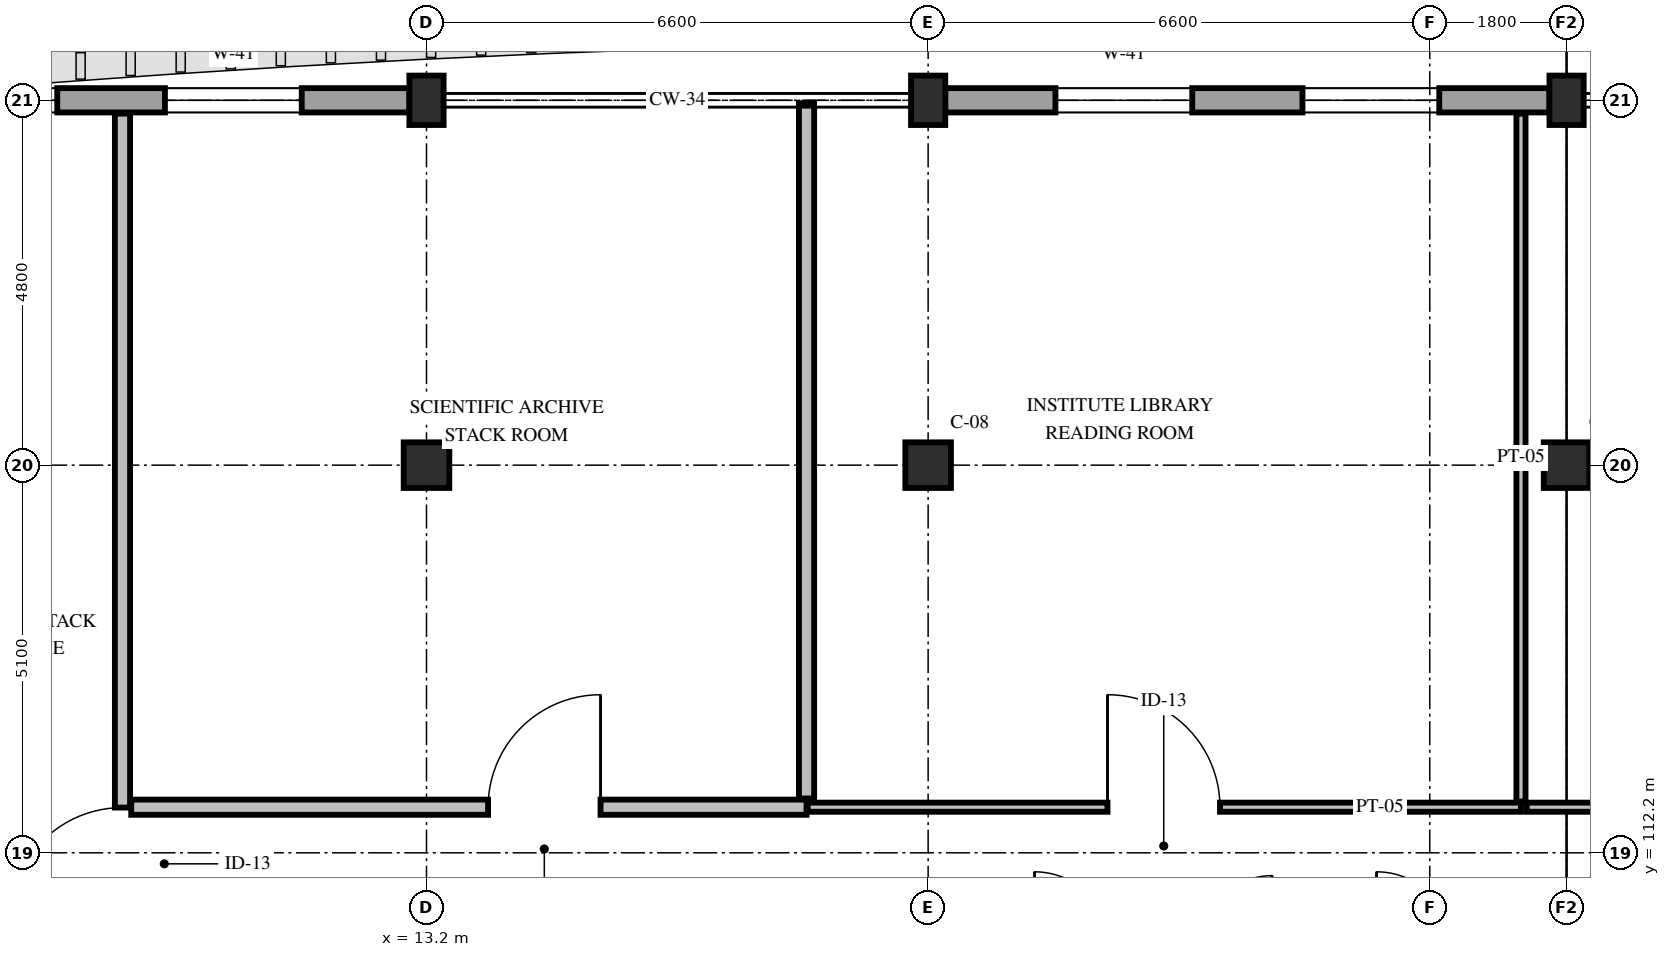
"""IFC4 building model, lengths in metres.
Left out: names, types, materials, properties, quantities, classifications, styles, units other than length and angle.
Written with IfcOpenShell. Run it as: python <this file> out.ifc"""

import sys

from ifc_helpers import new_model, si_unit, direction, frame, frame_2d, origin, origin_2d, place, context, subcontext, project, spatial, rectangle, extrude, element, fill, save


model = new_model("IFC4")
c1 = context("Model", 3, precision=1e-05, world=origin(), true_north=direction((0.0, 1.0)))
c2 = subcontext(c1, "Body", "Model", "MODEL_VIEW")
j1 = project(units=[si_unit("LENGTHUNIT", "METRE"), si_unit("PLANEANGLEUNIT", "RADIAN")], contexts=[c1])
p1 = place(None, origin())
s1 = spatial("IfcSite", under=j1, at=p1, CompositionType="ELEMENT")
p2 = place(p1, origin())
s2 = spatial("IfcBuilding", under=s1, at=p2, CompositionType="ELEMENT")
p3 = place(p2, frame((0.0, 0.0, 42.6)))
s3 = spatial("IfcBuildingStorey", under=s2, at=p3, CompositionType="ELEMENT", Elevation=42.6)
p4 = place(p3, frame((13.2, 117.3, 0.0), z_axis=(0.0, 0.0, 1.0), x_axis=(1.0, 0.0, 0.0)))
e1 = element("IfcColumn", 1, at=p4, inside=s3, PredefinedType="COLUMN", context=c2, shape_type="SweptSolid", body=[
    extrude(rectangle(XDim=0.6, YDim=0.6, at=origin_2d()), origin(), (0.0, 0.0, 1.0), 4.2),
])
p5 = place(p3, frame((13.2, 122.1, 0.0), z_axis=(0.0, 0.0, 1.0), x_axis=(1.0, 0.0, 0.0)))
e2 = element("IfcColumn", 2, at=p5, inside=s3, PredefinedType="PILASTER", context=c2, shape_type="SweptSolid", body=[
    extrude(rectangle(XDim=0.45, YDim=0.65, at=origin_2d()), origin(), (0.0, 0.0, 1.0), 4.2),
])
p6 = place(p3, frame((19.8, 117.3, 0.0), z_axis=(0.0, 0.0, 1.0), x_axis=(1.0, 0.0, 0.0)))
e3 = element("IfcColumn", 3, at=p6, inside=s3, PredefinedType="COLUMN", context=c2, shape_type="SweptSolid", body=[
    extrude(rectangle(XDim=0.6, YDim=0.6, at=origin_2d()), origin(), (0.0, 0.0, 1.0), 4.2),
])
p7 = place(p3, frame((19.8, 122.1, 0.0), z_axis=(0.0, 0.0, 1.0), x_axis=(1.0, 0.0, 0.0)))
e4 = element("IfcColumn", 4, at=p7, inside=s3, PredefinedType="PILASTER", context=c2, shape_type="SweptSolid", body=[
    extrude(rectangle(XDim=0.45, YDim=0.65, at=origin_2d()), origin(), (0.0, 0.0, 1.0), 4.2),
])
p8 = place(p3, frame((28.2, 117.3, 0.0), z_axis=(0.0, 0.0, 1.0), x_axis=(1.0, 0.0, 0.0)))
e5 = element("IfcColumn", 5, at=p8, inside=s3, PredefinedType="COLUMN", context=c2, shape_type="SweptSolid", body=[
    extrude(rectangle(XDim=0.6, YDim=0.6, at=origin_2d()), origin(), (0.0, 0.0, 1.0), 4.2),
])
p9 = place(p3, frame((28.2, 122.1, 0.0), z_axis=(0.0, 0.0, 1.0), x_axis=(1.0, 0.0, 0.0)))
e6 = element("IfcColumn", 6, at=p9, inside=s3, PredefinedType="PILASTER", context=c2, shape_type="SweptSolid", body=[
    extrude(rectangle(XDim=0.45, YDim=0.65, at=origin_2d()), origin(), (0.0, 0.0, 1.0), 4.2),
])
p10 = place(p3, frame((5.125, 122.1, 0.0), z_axis=(0.0, 0.0, 1.0), x_axis=(1.0, 0.0, 0.0)))
e7 = element("IfcWall", 7, at=p10, inside=s3, PredefinedType="STANDARD", context=c2, shape_type="SweptSolid", body=[
    extrude(rectangle(XDim=7.85, YDim=0.32, at=frame_2d((3.925, 0.0))), origin(), (0.0, 0.0, 1.0), 3.35),
])
p11 = place(p10, frame((1.417, 0.0, 0.65)))
e8 = element("IfcOpeningElement", 8, at=p11, cuts=e7, PredefinedType="OPENING", context=c2, shape_type="SweptSolid", body=[
    extrude(rectangle(XDim=1.8, YDim=2.24, at=frame_2d((0.9, 1.12))), frame((0.0, 0.175, 0.0), z_axis=(0.0, -1.0, 0.0), x_axis=(1.0, 0.0, 0.0)), (0.0, 0.0, 1.0), 0.35),
])
p12 = place(p10, frame((4.633, 0.0, 0.65)))
e9 = element("IfcOpeningElement", 9, at=p12, cuts=e7, PredefinedType="OPENING", context=c2, shape_type="SweptSolid", body=[
    extrude(rectangle(XDim=1.8, YDim=2.24, at=frame_2d((0.9, 1.12))), frame((0.0, 0.175, 0.0), z_axis=(0.0, -1.0, 0.0), x_axis=(1.0, 0.0, 0.0)), (0.0, 0.0, 1.0), 0.35),
])
p13 = place(p3, frame((20.025, 122.1, 0.0), z_axis=(0.0, 0.0, 1.0), x_axis=(1.0, 0.0, 0.0)))
e10 = element("IfcWall", 10, at=p13, inside=s3, PredefinedType="STANDARD", context=c2, shape_type="SweptSolid", body=[
    extrude(rectangle(XDim=7.95, YDim=0.32, at=frame_2d((3.975, 0.0))), origin(), (0.0, 0.0, 1.0), 3.35),
])
p14 = place(p13, frame((1.45, 0.0, 0.65)))
e11 = element("IfcOpeningElement", 11, at=p14, cuts=e10, PredefinedType="OPENING", context=c2, shape_type="SweptSolid", body=[
    extrude(rectangle(XDim=1.8, YDim=2.24, at=frame_2d((0.9, 1.12))), frame((0.0, 0.175, 0.0), z_axis=(0.0, -1.0, 0.0), x_axis=(1.0, 0.0, 0.0)), (0.0, 0.0, 1.0), 0.35),
])
p15 = place(p13, frame((4.7, 0.0, 0.65)))
e12 = element("IfcOpeningElement", 12, at=p15, cuts=e10, PredefinedType="OPENING", context=c2, shape_type="SweptSolid", body=[
    extrude(rectangle(XDim=1.8, YDim=2.24, at=frame_2d((0.9, 1.12))), frame((0.0, 0.175, 0.0), z_axis=(0.0, -1.0, 0.0), x_axis=(1.0, 0.0, 0.0)), (0.0, 0.0, 1.0), 0.35),
])
p16 = place(p3, frame((9.2, 111.065, 0.0), z_axis=(0.0, 0.0, 1.0), x_axis=(0.0, 1.0, 0.0)))
e13 = element("IfcWall", 13, at=p16, inside=s3, PredefinedType="PARTITIONING", context=c2, shape_type="SweptSolid", body=[
    extrude(rectangle(XDim=10.86, YDim=0.2, at=frame_2d((5.43, 0.0))), origin(), (0.0, 0.0, 1.0), 3.33),
])
p17 = place(p16, frame((0.25, 0.0, 0.0)))
e14 = element("IfcOpeningElement", 14, at=p17, cuts=e13, PredefinedType="OPENING", context=c2, shape_type="SweptSolid", body=[
    extrude(rectangle(XDim=1.48, YDim=2.3, at=frame_2d((0.74, 1.15))), frame((0.0, 0.115, 0.0), z_axis=(0.0, -1.0, 0.0), x_axis=(1.0, 0.0, 0.0)), (0.0, 0.0, 1.0), 0.23),
])
p18 = place(p3, frame((9.315, 112.8, 0.0), z_axis=(0.0, 0.0, 1.0), x_axis=(1.0, 0.0, 0.0)))
e15 = element("IfcWall", 15, at=p18, inside=s3, PredefinedType="PARTITIONING", context=c2, shape_type="SweptSolid", body=[
    extrude(rectangle(XDim=8.885, YDim=0.2, at=frame_2d((4.442, 0.0))), origin(), (0.0, 0.0, 1.0), 3.53),
])
p19 = place(p18, frame((4.695, 0.0, 0.0)))
e16 = element("IfcOpeningElement", 16, at=p19, cuts=e15, PredefinedType="OPENING", context=c2, shape_type="SweptSolid", body=[
    extrude(rectangle(XDim=1.48, YDim=2.3, at=frame_2d((0.74, 1.15))), frame((0.0, 0.115, 0.0), z_axis=(0.0, -1.0, 0.0), x_axis=(1.0, 0.0, 0.0)), (0.0, 0.0, 1.0), 0.23),
])
p20 = place(p3, frame((18.2, 112.915, 0.0), z_axis=(0.0, 0.0, 1.0), x_axis=(0.0, 1.0, 0.0)))
e17 = element("IfcWall", 17, at=p20, inside=s3, PredefinedType="PARTITIONING", context=c2, shape_type="SweptSolid", body=[
    extrude(rectangle(XDim=9.145, YDim=0.2, at=frame_2d((4.573, 0.0))), origin(), (0.0, 0.0, 1.0), 3.33),
])
p21 = place(p3, frame((18.215, 112.8, 0.0), z_axis=(0.0, 0.0, 1.0), x_axis=(1.0, 0.0, 0.0)))
e18 = element("IfcWall", 18, at=p21, inside=s3, PredefinedType="PARTITIONING", context=c2, shape_type="SweptSolid", body=[
    extrude(rectangle(XDim=9.385, YDim=0.12, at=frame_2d((4.692, 0.0))), origin(), (0.0, 0.0, 1.0), 3.53),
])
p22 = place(p21, frame((3.945, 0.0, 0.0)))
e19 = element("IfcOpeningElement", 19, at=p22, cuts=e18, PredefinedType="OPENING", context=c2, shape_type="SweptSolid", body=[
    extrude(rectangle(XDim=1.48, YDim=2.3, at=frame_2d((0.74, 1.15))), frame((0.0, 0.075, 0.0), z_axis=(0.0, -1.0, 0.0), x_axis=(1.0, 0.0, 0.0)), (0.0, 0.0, 1.0), 0.15),
])
p23 = place(p3, frame((27.6, 112.875, 0.0), z_axis=(0.0, 0.0, 1.0), x_axis=(0.0, 1.0, 0.0)))
e20 = element("IfcWall", 20, at=p23, inside=s3, PredefinedType="PARTITIONING", context=c2, shape_type="SweptSolid", body=[
    extrude(rectangle(XDim=9.05, YDim=0.12, at=frame_2d((4.525, 0.0))), origin(), (0.0, 0.0, 1.0), 3.33),
])
p24 = place(p3, frame((27.675, 112.8, 0.0), z_axis=(0.0, 0.0, 1.0), x_axis=(1.0, 0.0, 0.0)))
e21 = element("IfcWall", 21, at=p24, inside=s3, PredefinedType="PARTITIONING", context=c2, shape_type="SweptSolid", body=[
    extrude(rectangle(XDim=9.525, YDim=0.12, at=frame_2d((4.762, 0.0))), origin(), (0.0, 0.0, 1.0), 3.53),
])
p25 = place(p24, frame((6.155, 0.0, 0.0)))
e22 = element("IfcOpeningElement", 22, at=p25, cuts=e21, PredefinedType="OPENING", context=c2, shape_type="SweptSolid", body=[
    extrude(rectangle(XDim=1.44, YDim=2.25, at=frame_2d((0.72, 1.125))), frame((0.0, 0.075, 0.0), z_axis=(0.0, -1.0, 0.0), x_axis=(1.0, 0.0, 0.0)), (0.0, 0.0, 1.0), 0.15),
])
p26 = place(p11, origin())
e23 = element("IfcWindow", 23, at=p26, inside=s3, PartitioningType="DOUBLE_PANEL_VERTICAL", PredefinedType="WINDOW", context=c2, shape_type="SweptSolid", body=[
    extrude(rectangle(XDim=1.8, YDim=2.24, at=frame_2d((0.9, 1.12))), frame((0.0, 0.03, 0.0), z_axis=(0.0, -1.0, 0.0), x_axis=(1.0, 0.0, 0.0)), (0.0, 0.0, 1.0), 0.06),
])
fill(e8, e23)
p27 = place(p12, origin())
e24 = element("IfcWindow", 24, at=p27, inside=s3, PartitioningType="DOUBLE_PANEL_VERTICAL", PredefinedType="WINDOW", context=c2, shape_type="SweptSolid", body=[
    extrude(rectangle(XDim=1.8, YDim=2.24, at=frame_2d((0.9, 1.12))), frame((0.0, 0.03, 0.0), z_axis=(0.0, -1.0, 0.0), x_axis=(1.0, 0.0, 0.0)), (0.0, 0.0, 1.0), 0.06),
])
fill(e9, e24)
p28 = place(p14, origin())
e25 = element("IfcWindow", 25, at=p28, inside=s3, PartitioningType="DOUBLE_PANEL_VERTICAL", PredefinedType="WINDOW", context=c2, shape_type="SweptSolid", body=[
    extrude(rectangle(XDim=1.8, YDim=2.24, at=frame_2d((0.9, 1.12))), frame((0.0, 0.03, 0.0), z_axis=(0.0, -1.0, 0.0), x_axis=(1.0, 0.0, 0.0)), (0.0, 0.0, 1.0), 0.06),
])
fill(e11, e25)
p29 = place(p15, origin())
e26 = element("IfcWindow", 26, at=p29, inside=s3, PartitioningType="DOUBLE_PANEL_VERTICAL", PredefinedType="WINDOW", context=c2, shape_type="SweptSolid", body=[
    extrude(rectangle(XDim=1.8, YDim=2.24, at=frame_2d((0.9, 1.12))), frame((0.0, 0.03, 0.0), z_axis=(0.0, -1.0, 0.0), x_axis=(1.0, 0.0, 0.0)), (0.0, 0.0, 1.0), 0.06),
])
fill(e12, e26)
p30 = place(p17, origin())
e27 = element("IfcDoor", 27, at=p30, inside=s3, OperationType="SINGLE_SWING_LEFT", PredefinedType="DOOR", context=c2, shape_type="SweptSolid", body=[
    extrude(rectangle(XDim=1.48, YDim=2.3, at=frame_2d((0.74, 1.15))), frame((0.0, 0.025, 0.0), z_axis=(0.0, -1.0, 0.0), x_axis=(1.0, 0.0, 0.0)), (0.0, 0.0, 1.0), 0.05),
])
fill(e14, e27)
p31 = place(p19, origin())
e28 = element("IfcDoor", 28, at=p31, inside=s3, OperationType="SINGLE_SWING_RIGHT", PredefinedType="DOOR", context=c2, shape_type="SweptSolid", body=[
    extrude(rectangle(XDim=1.48, YDim=2.3, at=frame_2d((0.74, 1.15))), frame((0.0, 0.025, 0.0), z_axis=(0.0, -1.0, 0.0), x_axis=(1.0, 0.0, 0.0)), (0.0, 0.0, 1.0), 0.05),
])
fill(e16, e28)
p32 = place(p22, origin())
e29 = element("IfcDoor", 29, at=p32, inside=s3, OperationType="SINGLE_SWING_LEFT", PredefinedType="DOOR", context=c2, shape_type="SweptSolid", body=[
    extrude(rectangle(XDim=1.48, YDim=2.3, at=frame_2d((0.74, 1.15))), frame((0.0, 0.025, 0.0), z_axis=(0.0, -1.0, 0.0), x_axis=(1.0, 0.0, 0.0)), (0.0, 0.0, 1.0), 0.05),
])
fill(e19, e29)
save(model, sys.argv[1])
